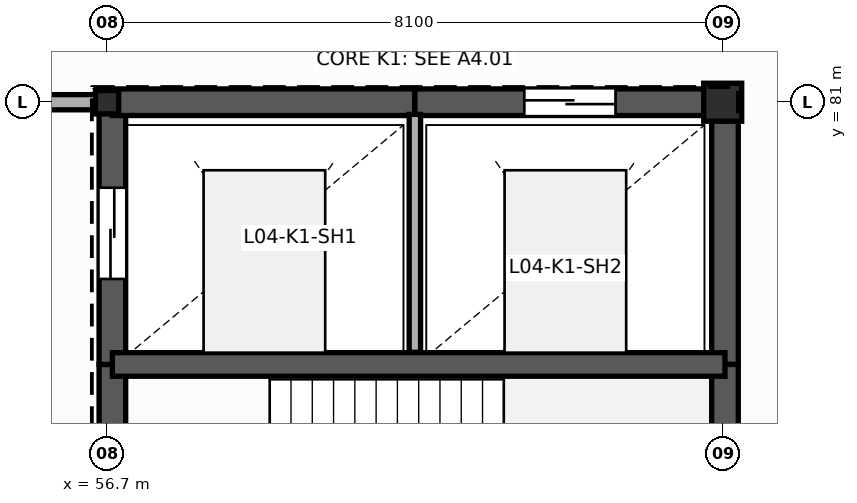
"""IFC4 building model, lengths in metres.
Left out: names, types, materials, properties, quantities, classifications, styles, units other than length and angle.
Written with IfcOpenShell. Run it as: python <this file> out.ifc"""

import sys

from ifc_helpers import new_model, si_unit, direction, frame, frame_2d, origin, origin_2d, place, context, subcontext, project, spatial, rectangle, i_section, extrude, element, fill, save


model = new_model("IFC4")
c1 = context("Model", 3, precision=1e-05, world=origin(), true_north=direction((0.0, 1.0)))
c2 = subcontext(c1, "Body", "Model", "MODEL_VIEW")
j1 = project(units=[si_unit("LENGTHUNIT", "METRE"), si_unit("PLANEANGLEUNIT", "RADIAN")], contexts=[c1])
p1 = place(None, origin())
s1 = spatial("IfcSite", under=j1, at=p1, CompositionType="ELEMENT")
p2 = place(p1, origin())
s2 = spatial("IfcBuilding", under=s1, at=p2, CompositionType="ELEMENT")
p3 = place(p2, frame((0.0, 0.0, 19.2)))
s3 = spatial("IfcBuildingStorey", under=s2, at=p3, CompositionType="ELEMENT", Elevation=19.2)
p4 = place(p3, frame((56.7, 81.0, 0.0), z_axis=(0.0, 0.0, 1.0), x_axis=(1.0, 0.0, 0.0)))
e1 = element("IfcColumn", 1, at=p4, inside=s3, PredefinedType="COLUMN", context=c2, shape_type="SweptSolid", body=[
    extrude(i_section(OverallWidth=0.305, OverallDepth=0.308, WebThickness=0.01, FlangeThickness=0.015, FilletRadius=0.015, at=origin_2d()), origin(), (0.0, 0.0, 1.0), 4.2),
])
p5 = place(p3, frame((64.8, 81.0, 0.0), z_axis=(0.0, 0.0, 1.0), x_axis=(1.0, 0.0, 0.0)))
e2 = element("IfcColumn", 2, at=p5, inside=s3, PredefinedType="COLUMN", context=c2, shape_type="SweptSolid", body=[
    extrude(rectangle(XDim=0.5, YDim=0.5, at=origin_2d()), origin(), (0.0, 0.0, 1.0), 4.2),
])
p6 = place(p3, frame((56.77, 73.13, 0.0), z_axis=(0.0, 0.0, 1.0), x_axis=(0.0, 1.0, 0.0)))
e3 = element("IfcWall", 3, at=p6, inside=s3, PredefinedType="SHEAR", context=c2, shape_type="SweptSolid", body=[
    extrude(rectangle(XDim=4.42, YDim=0.35, at=frame_2d((2.21, 0.0))), origin(), (0.0, 0.0, 1.0), 4.2),
])
p7 = place(p6, frame((1.35, 0.0, 0.0)))
e4 = element("IfcOpeningElement", 4, at=p7, cuts=e3, PredefinedType="OPENING", context=c2, shape_type="SweptSolid", body=[
    extrude(rectangle(XDim=1.2, YDim=2.25, at=frame_2d((0.6, 1.125))), frame((0.0, 0.185, 0.0), z_axis=(0.0, -1.0, 0.0), x_axis=(1.0, 0.0, 0.0)), (0.0, 0.0, 1.0), 0.37),
])
p8 = place(p3, frame((56.77, 77.55, 0.0), z_axis=(0.0, 0.0, 1.0), x_axis=(0.0, 1.0, 0.0)))
e5 = element("IfcWall", 5, at=p8, inside=s3, PredefinedType="SHEAR", context=c2, shape_type="SweptSolid", body=[
    extrude(rectangle(XDim=3.45, YDim=0.35, at=frame_2d((1.725, 0.0))), origin(), (0.0, 0.0, 1.0), 4.2),
])
p9 = place(p8, frame((1.125, 0.0, 0.0)))
e6 = element("IfcOpeningElement", 6, at=p9, cuts=e5, PredefinedType="OPENING", context=c2, shape_type="SweptSolid", body=[
    extrude(rectangle(XDim=1.2, YDim=2.2, at=frame_2d((0.6, 1.1))), frame((0.0, 0.185, 0.0), z_axis=(0.0, -1.0, 0.0), x_axis=(1.0, 0.0, 0.0)), (0.0, 0.0, 1.0), 0.37),
])
p10 = place(p3, frame((56.77, 81.0, 0.0), z_axis=(0.0, 0.0, 1.0), x_axis=(1.0, 0.0, 0.0)))
e7 = element("IfcWall", 7, at=p10, inside=s3, PredefinedType="SHEAR", context=c2, shape_type="SweptSolid", body=[
    extrude(rectangle(XDim=3.98, YDim=0.35, at=frame_2d((1.99, 0.0))), origin(), (0.0, 0.0, 1.0), 4.2),
])
p11 = place(p3, frame((60.75, 81.0, 0.0), z_axis=(0.0, 0.0, 1.0), x_axis=(1.0, 0.0, 0.0)))
e8 = element("IfcWall", 8, at=p11, inside=s3, PredefinedType="SHEAR", context=c2, shape_type="SweptSolid", body=[
    extrude(rectangle(XDim=4.08, YDim=0.35, at=frame_2d((2.04, 0.0))), origin(), (0.0, 0.0, 1.0), 4.2),
])
p12 = place(p11, frame((1.44, 0.0, 0.0)))
e9 = element("IfcOpeningElement", 9, at=p12, cuts=e8, PredefinedType="OPENING", context=c2, shape_type="SweptSolid", body=[
    extrude(rectangle(XDim=1.2, YDim=2.2, at=frame_2d((0.6, 1.1))), frame((0.0, 0.185, 0.0), z_axis=(0.0, -1.0, 0.0), x_axis=(1.0, 0.0, 0.0)), (0.0, 0.0, 1.0), 0.37),
])
p13 = place(p3, frame((64.83, 81.0, 0.0), z_axis=(0.0, 0.0, 1.0), x_axis=(0.0, -1.0, 0.0)))
e10 = element("IfcWall", 10, at=p13, inside=s3, PredefinedType="SHEAR", context=c2, shape_type="SweptSolid", body=[
    extrude(rectangle(XDim=3.45, YDim=0.35, at=frame_2d((1.725, 0.0))), origin(), (0.0, 0.0, 1.0), 4.2),
])
p14 = place(p3, frame((64.83, 77.55, 0.0), z_axis=(0.0, 0.0, 1.0), x_axis=(0.0, -1.0, 0.0)))
e11 = element("IfcWall", 11, at=p14, inside=s3, PredefinedType="SHEAR", context=c2, shape_type="SweptSolid", body=[
    extrude(rectangle(XDim=4.42, YDim=0.35, at=frame_2d((2.21, 0.0))), origin(), (0.0, 0.0, 1.0), 4.2),
])
p15 = place(p3, frame((56.77, 77.55, 0.0), z_axis=(0.0, 0.0, 1.0), x_axis=(1.0, 0.0, 0.0)))
e12 = element("IfcWall", 12, at=p15, inside=s3, PredefinedType="SHEAR", context=c2, shape_type="SweptSolid", body=[
    extrude(rectangle(XDim=8.06, YDim=0.31, at=frame_2d((4.03, 0.0))), origin(), (0.0, 0.0, 1.0), 4.2),
])
p16 = place(p3, frame((60.75, 77.71, 0.0), z_axis=(0.0, 0.0, 1.0), x_axis=(0.0, 1.0, 0.0)))
e13 = element("IfcWall", 13, at=p16, inside=s3, PredefinedType="PLUMBINGWALL", context=c2, shape_type="SweptSolid", body=[
    extrude(rectangle(XDim=3.13, YDim=0.15, at=frame_2d((1.565, 0.0))), origin(), (0.0, 0.0, 1.0), 3.85),
])
p17 = place(p3, frame((51.3, 81.0, 0.0), z_axis=(0.0, 0.0, 1.0), x_axis=(1.0, 0.0, 0.0)))
e14 = element("IfcWall", 14, at=p17, inside=s3, PredefinedType="PARTITIONING", context=c2, shape_type="SweptSolid", body=[
    extrude(rectangle(XDim=5.47, YDim=0.2, at=frame_2d((2.735, 0.0))), origin(), (0.0, 0.0, 1.0), 3.421),
])
p18 = place(p9, origin())
e15 = element("IfcDoor", 15, at=p18, inside=s3, OperationType="SLIDING_TO_LEFT", PredefinedType="DOOR", context=c2, shape_type="SweptSolid", body=[
    extrude(rectangle(XDim=1.2, YDim=2.2, at=frame_2d((0.6, 1.1))), frame((0.0, 0.025, 0.0), z_axis=(0.0, -1.0, 0.0), x_axis=(1.0, 0.0, 0.0)), (0.0, 0.0, 1.0), 0.05),
])
fill(e6, e15)
p19 = place(p12, origin())
e16 = element("IfcDoor", 16, at=p19, inside=s3, OperationType="SLIDING_TO_LEFT", PredefinedType="DOOR", context=c2, shape_type="SweptSolid", body=[
    extrude(rectangle(XDim=1.2, YDim=2.2, at=frame_2d((0.6, 1.1))), frame((0.0, 0.025, 0.0), z_axis=(0.0, -1.0, 0.0), x_axis=(1.0, 0.0, 0.0)), (0.0, 0.0, 1.0), 0.05),
])
fill(e9, e16)
save(model, sys.argv[1])
